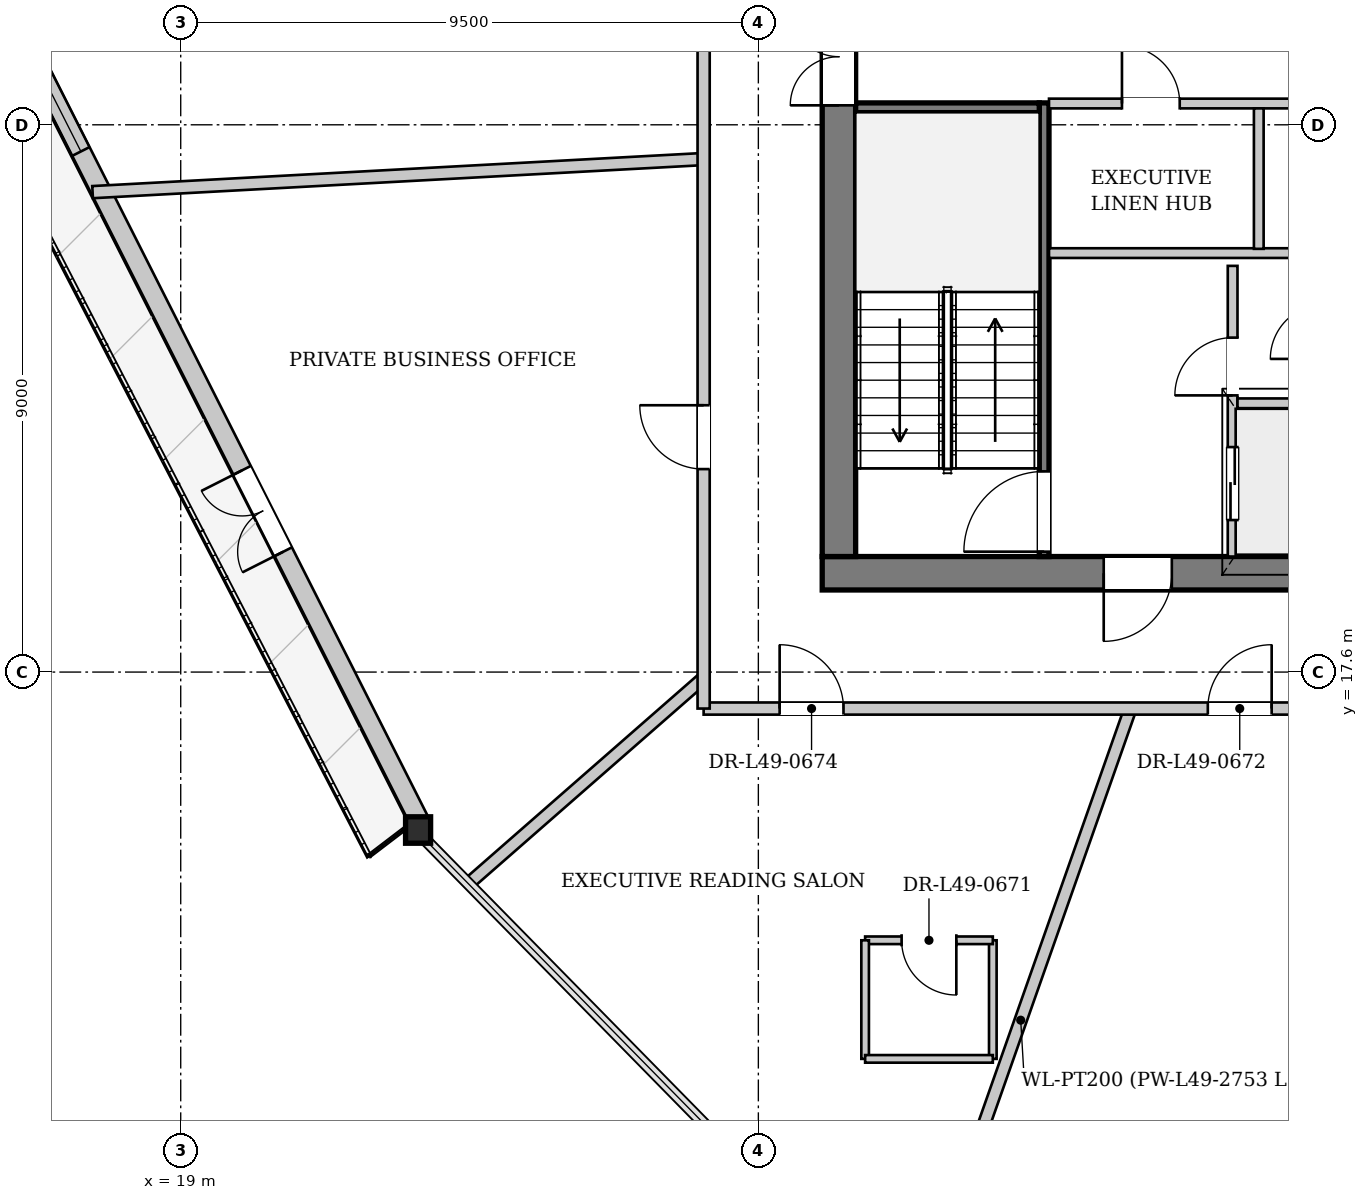
"""IFC4 building model, lengths in metres.
Left out: names, types, materials, properties, quantities, classifications, styles, units other than length and angle.
Written with IfcOpenShell. Run it as: python <this file> out.ifc"""

import sys

from ifc_helpers import new_model, si_unit, direction, frame, frame_2d, origin, origin_2d, place, context, subcontext, project, spatial, rectangle, i_section, extrude, source, transform, mapped, element, fill, save


model = new_model("IFC4")
c1 = context("Model", 3, precision=1e-05, world=origin(), true_north=direction((0.0, 1.0)))
c2 = subcontext(c1, "Body", "Model", "MODEL_VIEW")
j1 = project(units=[si_unit("LENGTHUNIT", "METRE"), si_unit("PLANEANGLEUNIT", "RADIAN")], contexts=[c1])
p1 = place(None, origin())
s1 = spatial("IfcSite", under=j1, at=p1, CompositionType="ELEMENT")
p2 = place(p1, origin())
s2 = spatial("IfcBuilding", under=s1, at=p2, CompositionType="ELEMENT")
p3 = place(p2, frame((0.0, 0.0, 185.65)))
s3 = spatial("IfcBuildingStorey", under=s2, at=p3, CompositionType="ELEMENT", Elevation=185.65)
m1 = source(origin(), c2, "Body", "SweptSolid", [
    extrude(i_section(OverallWidth=0.412, OverallDepth=0.435, WebThickness=0.031, FlangeThickness=0.05, at=origin_2d()), origin(), (0.0, 0.0, 1.0), 3.4),
])
p4 = place(p3, frame((22.775, 15.093, 0.0), z_axis=(0.075836030709, -0.053070858612, 0.995706975175), x_axis=(0.573358197873, 0.819304813199, 0.0)))
e1 = element("IfcColumn", 1, at=p4, inside=s3, PredefinedType="COLUMN", context=c2, shape_type="MappedRepresentation", body=[
    mapped(m1, transform((0.0, 0.0, 0.0), x_axis=(1.0, 0.0, 0.0), y_axis=(0.0, 1.0, 0.0), z_axis=(0.0, 0.0, 1.0), scale=1.0)),
])
p5 = place(p3, frame((22.918, 15.165, 0.0), z_axis=(0.0, 0.0, 1.0), x_axis=(-0.451192327093, 0.892426738714, 0.0)))
e2 = element("IfcWall", 2, at=p5, inside=s3, PredefinedType="SOLIDWALL", context=c2, shape_type="SweptSolid", body=[
    extrude(rectangle(XDim=17.8, YDim=0.32, at=frame_2d((8.9, 0.0))), origin(), (0.0, 0.0, 1.0), 2.722),
])
p6 = place(p5, frame((4.946, 0.0, 0.0)))
e3 = element("IfcOpeningElement", 3, at=p6, cuts=e2, PredefinedType="OPENING", context=c2, shape_type="SweptSolid", body=[
    extrude(rectangle(XDim=1.5, YDim=2.3, at=frame_2d((0.75, 1.15))), frame((0.0, 0.17, 0.0), z_axis=(0.0, -1.0, 0.0), x_axis=(1.0, 0.0, 0.0)), (0.0, 0.0, 1.0), 0.34),
])
p7 = place(p5, frame((12.322, 0.0, 0.252)))
e4 = element("IfcOpeningElement", 4, at=p7, cuts=e2, PredefinedType="OPENING", context=c2, shape_type="SweptSolid", body=[
    extrude(rectangle(XDim=2.6, YDim=2.35, at=frame_2d((1.3, 1.175))), frame((0.0, 0.17, 0.0), z_axis=(0.0, -1.0, 0.0), x_axis=(1.0, 0.0, 0.0)), (0.0, 0.0, 1.0), 0.34),
])
p8 = place(p3, frame((46.45, 19.225, 0.0), z_axis=(0.0, 0.0, 1.0), x_axis=(-1.0, 0.0, 0.0)))
e5 = element("IfcWall", 5, at=p8, inside=s3, PredefinedType="SHEAR", context=c2, shape_type="SweptSolid", body=[
    extrude(rectangle(XDim=16.9, YDim=0.55, at=frame_2d((8.45, 0.0))), origin(), (0.0, 0.0, 1.0), 3.33),
])
p9 = place(p8, frame((4.65, 0.0, 0.0)))
e6 = element("IfcOpeningElement", 6, at=p9, cuts=e5, PredefinedType="OPENING", context=c2, shape_type="SweptSolid", body=[
    extrude(rectangle(XDim=1.12, YDim=2.25, at=frame_2d((0.56, 1.125))), frame((0.0, 0.285, 0.0), z_axis=(0.0, -1.0, 0.0), x_axis=(1.0, 0.0, 0.0)), (0.0, 0.0, 1.0), 0.57),
])
p10 = place(p8, frame((11.15, 0.0, 0.0)))
e7 = element("IfcOpeningElement", 7, at=p10, cuts=e5, PredefinedType="OPENING", context=c2, shape_type="SweptSolid", body=[
    extrude(rectangle(XDim=1.12, YDim=2.25, at=frame_2d((0.56, 1.125))), frame((0.0, 0.285, 0.0), z_axis=(0.0, -1.0, 0.0), x_axis=(1.0, 0.0, 0.0)), (0.0, 0.0, 1.0), 0.57),
])
p11 = place(p3, frame((29.825, 19.5, 0.0), z_axis=(0.0, 0.0, 1.0), x_axis=(0.0, 1.0, 0.0)))
e8 = element("IfcWall", 8, at=p11, inside=s3, PredefinedType="SHEAR", context=c2, shape_type="SweptSolid", body=[
    extrude(rectangle(XDim=14.2, YDim=0.55, at=frame_2d((7.1, 0.0))), origin(), (0.0, 0.0, 1.0), 3.33),
])
p12 = place(p11, frame((7.42, 0.0, 0.0)))
e9 = element("IfcOpeningElement", 9, at=p12, cuts=e8, PredefinedType="OPENING", context=c2, shape_type="SweptSolid", body=[
    extrude(rectangle(XDim=1.6, YDim=2.2, at=frame_2d((0.8, 1.1))), frame((0.0, 0.285, 0.0), z_axis=(0.0, -1.0, 0.0), x_axis=(1.0, 0.0, 0.0)), (0.0, 0.0, 1.0), 0.57),
])
p13 = place(p3, frame((33.2, 19.5, 0.0), z_axis=(0.0, 0.0, 1.0), x_axis=(0.0, 1.0, 0.0)))
e10 = element("IfcWall", 10, at=p13, inside=s3, PredefinedType="PARTITIONING", context=c2, shape_type="SweptSolid", body=[
    extrude(rectangle(XDim=7.46, YDim=0.16, at=frame_2d((3.73, 0.0))), origin(), (0.0, 0.0, 1.0), 3.33),
])
p14 = place(p13, frame((0.08, 0.0, 0.0)))
e11 = element("IfcOpeningElement", 11, at=p14, cuts=e10, PredefinedType="OPENING", context=c2, shape_type="SweptSolid", body=[
    extrude(rectangle(XDim=1.32, YDim=2.2, at=frame_2d((0.66, 1.1))), frame((0.0, 0.09, 0.0), z_axis=(0.0, -1.0, 0.0), x_axis=(1.0, 0.0, 0.0)), (0.0, 0.0, 1.0), 0.18),
])
p15 = place(p3, frame((30.1, 26.88, 0.0), z_axis=(0.0, 0.0, 1.0), x_axis=(1.0, 0.0, 0.0)))
e12 = element("IfcWall", 12, at=p15, inside=s3, PredefinedType="PARTITIONING", context=c2, shape_type="SweptSolid", body=[
    extrude(rectangle(XDim=3.02, YDim=0.16, at=frame_2d((1.51, 0.0))), origin(), (0.0, 0.0, 1.0), 3.33),
])
p16 = place(p3, frame((36.3, 19.5, 0.0), z_axis=(0.0, 0.0, 1.0), x_axis=(0.0, 1.0, 0.0)))
e13 = element("IfcWall", 13, at=p16, inside=s3, PredefinedType="PARTITIONING", context=c2, shape_type="SweptSolid", body=[
    extrude(rectangle(XDim=4.78, YDim=0.16, at=frame_2d((2.39, 0.0))), origin(), (0.0, 0.0, 1.0), 3.33),
])
p17 = place(p16, frame((0.6, 0.0, 0.0)))
e14 = element("IfcOpeningElement", 14, at=p17, cuts=e13, PredefinedType="OPENING", context=c2, shape_type="SweptSolid", body=[
    extrude(rectangle(XDim=1.2, YDim=2.2, at=frame_2d((0.6, 1.1))), frame((0.0, 0.09, 0.0), z_axis=(0.0, -1.0, 0.0), x_axis=(1.0, 0.0, 0.0)), (0.0, 0.0, 1.0), 0.18),
])
p18 = place(p16, frame((2.65, 0.0, 0.0)))
e15 = element("IfcOpeningElement", 15, at=p18, cuts=e13, PredefinedType="OPENING", context=c2, shape_type="SweptSolid", body=[
    extrude(rectangle(XDim=0.95, YDim=2.1, at=frame_2d((0.475, 1.05))), frame((0.0, 0.09, 0.0), z_axis=(0.0, -1.0, 0.0), x_axis=(1.0, 0.0, 0.0)), (0.0, 0.0, 1.0), 0.18),
])
p19 = place(p3, frame((36.38, 22.02, 0.0), z_axis=(0.0, 0.0, 1.0), x_axis=(1.0, 0.0, 0.0)))
e16 = element("IfcWall", 16, at=p19, inside=s3, PredefinedType="PARTITIONING", context=c2, shape_type="SweptSolid", body=[
    extrude(rectangle(XDim=3.24, YDim=0.16, at=frame_2d((1.62, 0.0))), origin(), (0.0, 0.0, 1.0), 3.33),
])
p20 = place(p3, frame((33.28, 24.49, 0.0), z_axis=(0.0, 0.0, 1.0), x_axis=(1.0, 0.0, 0.0)))
e17 = element("IfcWall", 17, at=p20, inside=s3, PredefinedType="PARTITIONING", context=c2, shape_type="SweptSolid", body=[
    extrude(rectangle(XDim=9.44, YDim=0.16, at=frame_2d((4.72, 0.0))), origin(), (0.0, 0.0, 1.0), 3.33),
])
p21 = place(p3, frame((33.28, 26.95, 0.0), z_axis=(0.0, 0.0, 1.0), x_axis=(1.0, 0.0, 0.0)))
e18 = element("IfcWall", 18, at=p21, inside=s3, PredefinedType="PARTITIONING", context=c2, shape_type="SweptSolid", body=[
    extrude(rectangle(XDim=9.44, YDim=0.16, at=frame_2d((4.72, 0.0))), origin(), (0.0, 0.0, 1.0), 3.33),
])
p22 = place(p21, frame((1.2, 0.0, 0.0)))
e19 = element("IfcOpeningElement", 19, at=p22, cuts=e18, PredefinedType="OPENING", context=c2, shape_type="SweptSolid", body=[
    extrude(rectangle(XDim=0.95, YDim=2.1, at=frame_2d((0.475, 1.05))), frame((0.0, 0.09, 0.0), z_axis=(0.0, -1.0, 0.0), x_axis=(1.0, 0.0, 0.0)), (0.0, 0.0, 1.0), 0.18),
])
p23 = place(p21, frame((4.65, 0.0, 0.0)))
e20 = element("IfcOpeningElement", 20, at=p23, cuts=e18, PredefinedType="OPENING", context=c2, shape_type="SweptSolid", body=[
    extrude(rectangle(XDim=0.95, YDim=2.1, at=frame_2d((0.475, 1.05))), frame((0.0, 0.09, 0.0), z_axis=(0.0, -1.0, 0.0), x_axis=(1.0, 0.0, 0.0)), (0.0, 0.0, 1.0), 0.18),
])
p24 = place(p21, frame((7.67, 0.0, 0.0)))
e21 = element("IfcOpeningElement", 21, at=p24, cuts=e18, PredefinedType="OPENING", context=c2, shape_type="SweptSolid", body=[
    extrude(rectangle(XDim=1.1, YDim=2.2, at=frame_2d((0.55, 1.1))), frame((0.0, 0.09, 0.0), z_axis=(0.0, -1.0, 0.0), x_axis=(1.0, 0.0, 0.0)), (0.0, 0.0, 1.0), 0.18),
])
p25 = place(p3, frame((36.73, 24.56, 0.0), z_axis=(0.0, 0.0, 1.0), x_axis=(0.0, 1.0, 0.0)))
e22 = element("IfcWall", 22, at=p25, inside=s3, PredefinedType="PARTITIONING", context=c2, shape_type="SweptSolid", body=[
    extrude(rectangle(XDim=2.31, YDim=0.16, at=frame_2d((1.155, 0.0))), origin(), (0.0, 0.0, 1.0), 3.33),
])
p26 = place(p3, frame((34.619, 17.0, 0.0), z_axis=(0.0, 0.0, 1.0), x_axis=(-0.332157214304, -0.943224037536, 0.0)))
e23 = element("IfcWall", 23, at=p26, inside=s3, PredefinedType="PARTITIONING", context=c2, shape_type="SweptSolid", body=[
    extrude(rectangle(XDim=10.866, YDim=0.2, at=frame_2d((5.433, 0.0))), origin(), (0.0, 0.0, 1.0), 3.33),
])
p27 = place(p3, frame((27.6, 26.037, 0.0), z_axis=(0.0, 0.0, 1.0), x_axis=(-0.998535764229, -0.054095541001, 0.0)))
e24 = element("IfcWall", 24, at=p27, inside=s3, PredefinedType="PARTITIONING", context=c2, shape_type="SweptSolid", body=[
    extrude(rectangle(XDim=10.064, YDim=0.2, at=frame_2d((5.032, 0.0))), origin(), (0.0, 0.0, 1.0), 3.33),
])
p28 = place(p3, frame((27.6, 17.503, 0.0), z_axis=(0.0, 0.0, 1.0), x_axis=(-0.752689151481, -0.658376063692, 0.0)))
e25 = element("IfcWall", 25, at=p28, inside=s3, PredefinedType="PARTITIONING", context=c2, shape_type="SweptSolid", body=[
    extrude(rectangle(XDim=5.11, YDim=0.2, at=frame_2d((2.555, 0.0))), origin(), (0.0, 0.0, 1.0), 3.33),
])
p29 = place(p3, frame((32.356, 11.239, 0.0), z_axis=(0.0, 0.0, 1.0), x_axis=(0.0, 1.0, 0.0)))
e26 = element("IfcWall", 26, at=p29, inside=s3, PredefinedType="PARTITIONING", context=c2, shape_type="SweptSolid", body=[
    extrude(rectangle(XDim=1.95, YDim=0.125, at=frame_2d((0.975, 0.0))), origin(), (0.0, 0.0, 1.0), 3.33),
])
p30 = place(p3, frame((32.356, 13.189, 0.0), z_axis=(0.0, 0.0, 1.0), x_axis=(-1.0, 0.0, 0.0)))
e27 = element("IfcWall", 27, at=p30, inside=s3, PredefinedType="PARTITIONING", context=c2, shape_type="SweptSolid", body=[
    extrude(rectangle(XDim=2.1, YDim=0.125, at=frame_2d((1.05, 0.0))), origin(), (0.0, 0.0, 1.0), 3.33),
])
p31 = place(p30, frame((0.6, 0.0, 0.0)))
e28 = element("IfcOpeningElement", 28, at=p31, cuts=e27, PredefinedType="OPENING", context=c2, shape_type="SweptSolid", body=[
    extrude(rectangle(XDim=0.9, YDim=2.1, at=frame_2d((0.45, 1.05))), frame((0.0, 0.073, 0.0), z_axis=(0.0, -1.0, 0.0), x_axis=(1.0, 0.0, 0.0)), (0.0, 0.0, 1.0), 0.145),
])
p32 = place(p3, frame((30.256, 13.189, 0.0), z_axis=(0.0, 0.0, 1.0), x_axis=(0.0, -1.0, 0.0)))
e29 = element("IfcWall", 29, at=p32, inside=s3, PredefinedType="PARTITIONING", context=c2, shape_type="SweptSolid", body=[
    extrude(rectangle(XDim=1.95, YDim=0.125, at=frame_2d((0.975, 0.0))), origin(), (0.0, 0.0, 1.0), 3.33),
])
p33 = place(p3, frame((30.256, 11.239, 0.0), z_axis=(0.0, 0.0, 1.0), x_axis=(1.0, 0.0, 0.0)))
e30 = element("IfcWall", 30, at=p33, inside=s3, PredefinedType="PARTITIONING", context=c2, shape_type="SweptSolid", body=[
    extrude(rectangle(XDim=2.1, YDim=0.125, at=frame_2d((1.05, 0.0))), origin(), (0.0, 0.0, 1.0), 3.33),
])
p34 = place(p3, frame((27.6, 17.0, 0.0), z_axis=(0.0, 0.0, 1.0), x_axis=(1.0, 0.0, 0.0)))
e31 = element("IfcWall", 31, at=p34, inside=s3, PredefinedType="PARTITIONING", context=c2, shape_type="SweptSolid", body=[
    extrude(rectangle(XDim=20.8, YDim=0.2, at=frame_2d((10.4, 0.0))), origin(), (0.0, 0.0, 1.0), 3.33),
])
p35 = place(p34, frame((8.292, 0.0, 0.0)))
e32 = element("IfcOpeningElement", 32, at=p35, cuts=e31, PredefinedType="OPENING", context=c2, shape_type="SweptSolid", body=[
    extrude(rectangle(XDim=1.05, YDim=2.2, at=frame_2d((0.525, 1.1))), frame((0.0, 0.11, 0.0), z_axis=(0.0, -1.0, 0.0), x_axis=(1.0, 0.0, 0.0)), (0.0, 0.0, 1.0), 0.22),
])
p36 = place(p34, frame((15.097, 0.0, 0.0)))
e33 = element("IfcOpeningElement", 33, at=p36, cuts=e31, PredefinedType="OPENING", context=c2, shape_type="SweptSolid", body=[
    extrude(rectangle(XDim=1.05, YDim=2.2, at=frame_2d((0.525, 1.1))), frame((0.0, 0.11, 0.0), z_axis=(0.0, -1.0, 0.0), x_axis=(1.0, 0.0, 0.0)), (0.0, 0.0, 1.0), 0.22),
])
p37 = place(p34, frame((1.25, 0.0, 0.0)))
e34 = element("IfcOpeningElement", 34, at=p37, cuts=e31, PredefinedType="OPENING", context=c2, shape_type="SweptSolid", body=[
    extrude(rectangle(XDim=1.05, YDim=2.2, at=frame_2d((0.525, 1.1))), frame((0.0, 0.11, 0.0), z_axis=(0.0, -1.0, 0.0), x_axis=(1.0, 0.0, 0.0)), (0.0, 0.0, 1.0), 0.22),
])
p38 = place(p3, frame((27.6, 17.0, 0.0), z_axis=(0.0, 0.0, 1.0), x_axis=(0.0, 1.0, 0.0)))
e35 = element("IfcWall", 35, at=p38, inside=s3, PredefinedType="PARTITIONING", context=c2, shape_type="SweptSolid", body=[
    extrude(rectangle(XDim=19.2, YDim=0.2, at=frame_2d((9.6, 0.0))), origin(), (0.0, 0.0, 1.0), 3.33),
])
p39 = place(p38, frame((15.392, 0.0, 0.0)))
e36 = element("IfcOpeningElement", 36, at=p39, cuts=e35, PredefinedType="OPENING", context=c2, shape_type="SweptSolid", body=[
    extrude(rectangle(XDim=1.05, YDim=2.2, at=frame_2d((0.525, 1.1))), frame((0.0, 0.11, 0.0), z_axis=(0.0, -1.0, 0.0), x_axis=(1.0, 0.0, 0.0)), (0.0, 0.0, 1.0), 0.22),
])
p40 = place(p38, frame((3.938, 0.0, 0.0)))
e37 = element("IfcOpeningElement", 37, at=p40, cuts=e35, PredefinedType="OPENING", context=c2, shape_type="SweptSolid", body=[
    extrude(rectangle(XDim=1.05, YDim=2.2, at=frame_2d((0.525, 1.1))), frame((0.0, 0.11, 0.0), z_axis=(0.0, -1.0, 0.0), x_axis=(1.0, 0.0, 0.0)), (0.0, 0.0, 1.0), 0.22),
])
m2 = source(origin(), c2, "Body", "SweptSolid", [
    extrude(rectangle(XDim=1.5, YDim=2.3, at=frame_2d((0.75, 1.15))), frame((0.0, 0.025, 0.0), z_axis=(0.0, -1.0, 0.0), x_axis=(1.0, 0.0, 0.0)), (0.0, 0.0, 1.0), 0.05),
])
p41 = place(p6, origin())
e38 = element("IfcDoor", 38, at=p41, inside=s3, OperationType="DOUBLE_DOOR_SINGLE_SWING", PredefinedType="DOOR", context=c2, shape_type="MappedRepresentation", body=[
    mapped(m2, transform((0.0, 0.0, 0.0), x_axis=(1.0, 0.0, 0.0), y_axis=(0.0, 1.0, 0.0), z_axis=(0.0, 0.0, 1.0), scale=1.0)),
])
fill(e3, e38)
m3 = source(origin(), c2, "Body", "SweptSolid", [
    extrude(rectangle(XDim=2.6, YDim=2.35, at=frame_2d((1.3, 1.175))), frame((0.0, 0.03, 0.0), z_axis=(0.0, -1.0, 0.0), x_axis=(1.0, 0.0, 0.0)), (0.0, 0.0, 1.0), 0.06),
])
p42 = place(p7, origin())
e39 = element("IfcWindow", 39, at=p42, inside=s3, PartitioningType="SINGLE_PANEL", PredefinedType="WINDOW", context=c2, shape_type="MappedRepresentation", body=[
    mapped(m3, transform((0.0, 0.0, 0.0), x_axis=(1.0, 0.0, 0.0), y_axis=(0.0, 1.0, 0.0), z_axis=(0.0, 0.0, 1.0), scale=1.0)),
])
fill(e4, e39)
m4 = source(origin(), c2, "Body", "SweptSolid", [
    extrude(rectangle(XDim=1.12, YDim=2.25, at=frame_2d((0.56, 1.125))), frame((0.0, 0.025, 0.0), z_axis=(0.0, -1.0, 0.0), x_axis=(1.0, 0.0, 0.0)), (0.0, 0.0, 1.0), 0.05),
])
p43 = place(p10, origin())
e40 = element("IfcDoor", 40, at=p43, inside=s3, OperationType="SINGLE_SWING_RIGHT", PredefinedType="DOOR", context=c2, shape_type="MappedRepresentation", body=[
    mapped(m4, transform((0.0, 0.0, 0.0), x_axis=(1.0, 0.0, 0.0), y_axis=(0.0, 1.0, 0.0), z_axis=(0.0, 0.0, 1.0), scale=1.0)),
])
fill(e7, e40)
m5 = source(origin(), c2, "Body", "SweptSolid", [
    extrude(rectangle(XDim=1.6, YDim=2.2, at=frame_2d((0.8, 1.1))), frame((0.0, 0.025, 0.0), z_axis=(0.0, -1.0, 0.0), x_axis=(1.0, 0.0, 0.0)), (0.0, 0.0, 1.0), 0.05),
])
p44 = place(p12, origin())
e41 = element("IfcDoor", 41, at=p44, inside=s3, OperationType="DOUBLE_DOOR_SINGLE_SWING", PredefinedType="DOOR", context=c2, shape_type="MappedRepresentation", body=[
    mapped(m5, transform((0.0, 0.0, 0.0), x_axis=(1.0, 0.0, 0.0), y_axis=(0.0, 1.0, 0.0), z_axis=(0.0, 0.0, 1.0), scale=1.0)),
])
fill(e9, e41)
m6 = source(origin(), c2, "Body", "SweptSolid", [
    extrude(rectangle(XDim=1.32, YDim=2.2, at=frame_2d((0.66, 1.1))), frame((0.0, 0.025, 0.0), z_axis=(0.0, -1.0, 0.0), x_axis=(1.0, 0.0, 0.0)), (0.0, 0.0, 1.0), 0.05),
])
p45 = place(p14, origin())
e42 = element("IfcDoor", 42, at=p45, inside=s3, OperationType="SINGLE_SWING_LEFT", PredefinedType="DOOR", context=c2, shape_type="MappedRepresentation", body=[
    mapped(m6, transform((0.0, 0.0, 0.0), x_axis=(1.0, 0.0, 0.0), y_axis=(0.0, 1.0, 0.0), z_axis=(0.0, 0.0, 1.0), scale=1.0)),
])
fill(e11, e42)
m7 = source(origin(), c2, "Body", "SweptSolid", [
    extrude(rectangle(XDim=1.2, YDim=2.2, at=frame_2d((0.6, 1.1))), frame((0.0, 0.025, 0.0), z_axis=(0.0, -1.0, 0.0), x_axis=(1.0, 0.0, 0.0)), (0.0, 0.0, 1.0), 0.05),
])
p46 = place(p17, origin())
e43 = element("IfcDoor", 43, at=p46, inside=s3, OperationType="DOUBLE_DOOR_SLIDING", PredefinedType="DOOR", context=c2, shape_type="MappedRepresentation", body=[
    mapped(m7, transform((0.0, 0.0, 0.0), x_axis=(1.0, 0.0, 0.0), y_axis=(0.0, 1.0, 0.0), z_axis=(0.0, 0.0, 1.0), scale=1.0)),
])
fill(e14, e43)
m8 = source(origin(), c2, "Body", "SweptSolid", [
    extrude(rectangle(XDim=0.95, YDim=2.1, at=frame_2d((0.475, 1.05))), frame((0.0, 0.025, 0.0), z_axis=(0.0, -1.0, 0.0), x_axis=(1.0, 0.0, 0.0)), (0.0, 0.0, 1.0), 0.05),
])
p47 = place(p18, origin())
e44 = element("IfcDoor", 44, at=p47, inside=s3, OperationType="SINGLE_SWING_LEFT", PredefinedType="DOOR", context=c2, shape_type="MappedRepresentation", body=[
    mapped(m8, transform((0.0, 0.0, 0.0), x_axis=(1.0, 0.0, 0.0), y_axis=(0.0, 1.0, 0.0), z_axis=(0.0, 0.0, 1.0), scale=1.0)),
])
fill(e15, e44)
p48 = place(p22, origin())
e45 = element("IfcDoor", 45, at=p48, inside=s3, OperationType="SINGLE_SWING_LEFT", PredefinedType="DOOR", context=c2, shape_type="MappedRepresentation", body=[
    mapped(m8, transform((0.0, 0.0, 0.0), x_axis=(1.0, 0.0, 0.0), y_axis=(0.0, 1.0, 0.0), z_axis=(0.0, 0.0, 1.0), scale=1.0)),
])
fill(e19, e45)
m9 = source(origin(), c2, "Body", "SweptSolid", [
    extrude(rectangle(XDim=0.9, YDim=2.1, at=frame_2d((0.45, 1.05))), frame((0.0, 0.025, 0.0), z_axis=(0.0, -1.0, 0.0), x_axis=(1.0, 0.0, 0.0)), (0.0, 0.0, 1.0), 0.05),
])
p49 = place(p31, origin())
e46 = element("IfcDoor", 46, at=p49, inside=s3, OperationType="SINGLE_SWING_LEFT", PredefinedType="DOOR", context=c2, shape_type="MappedRepresentation", body=[
    mapped(m9, transform((0.0, 0.0, 0.0), x_axis=(1.0, 0.0, 0.0), y_axis=(0.0, 1.0, 0.0), z_axis=(0.0, 0.0, 1.0), scale=1.0)),
])
fill(e28, e46)
m10 = source(origin(), c2, "Body", "SweptSolid", [
    extrude(rectangle(XDim=1.05, YDim=2.2, at=frame_2d((0.525, 1.1))), frame((0.0, 0.025, 0.0), z_axis=(0.0, -1.0, 0.0), x_axis=(1.0, 0.0, 0.0)), (0.0, 0.0, 1.0), 0.05),
])
p50 = place(p35, origin())
e47 = element("IfcDoor", 47, at=p50, inside=s3, OperationType="SINGLE_SWING_RIGHT", PredefinedType="DOOR", context=c2, shape_type="MappedRepresentation", body=[
    mapped(m10, transform((0.0, 0.0, 0.0), x_axis=(1.0, 0.0, 0.0), y_axis=(0.0, 1.0, 0.0), z_axis=(0.0, 0.0, 1.0), scale=1.0)),
])
fill(e32, e47)
p51 = place(p37, origin())
e48 = element("IfcDoor", 48, at=p51, inside=s3, OperationType="SINGLE_SWING_LEFT", PredefinedType="DOOR", context=c2, shape_type="MappedRepresentation", body=[
    mapped(m10, transform((0.0, 0.0, 0.0), x_axis=(1.0, 0.0, 0.0), y_axis=(0.0, 1.0, 0.0), z_axis=(0.0, 0.0, 1.0), scale=1.0)),
])
fill(e34, e48)
p52 = place(p40, origin())
e49 = element("IfcDoor", 49, at=p52, inside=s3, OperationType="SINGLE_SWING_RIGHT", PredefinedType="DOOR", context=c2, shape_type="MappedRepresentation", body=[
    mapped(m10, transform((0.0, 0.0, 0.0), x_axis=(1.0, 0.0, 0.0), y_axis=(0.0, 1.0, 0.0), z_axis=(0.0, 0.0, 1.0), scale=1.0)),
])
fill(e37, e49)
save(model, sys.argv[1])
